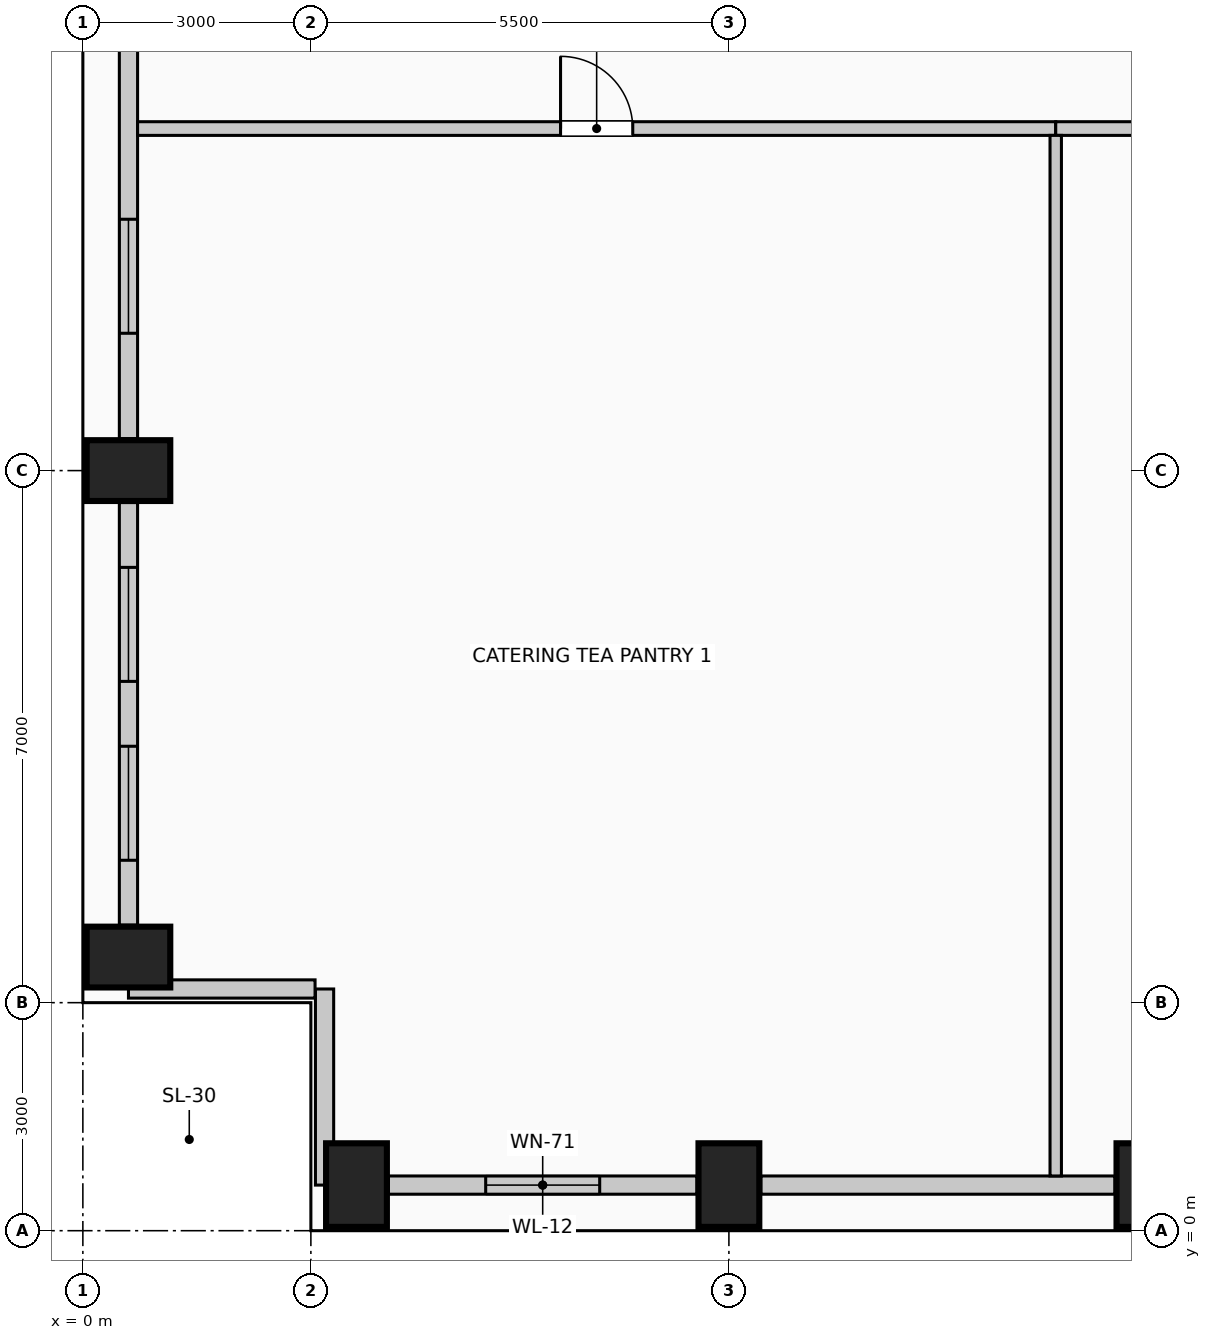
"""IFC4 building model, lengths in metres.
Left out: names, types, materials, properties, quantities, classifications, styles, units other than length and angle.
Written with IfcOpenShell. Run it as: python <this file> out.ifc"""

import sys

from ifc_helpers import new_model, si_unit, direction, frame, frame_2d, origin, origin_2d, place, context, subcontext, project, spatial, rectangle, extrude, element, fill, save


model = new_model("IFC4")
c1 = context("Model", 3, precision=1e-05, world=origin(), true_north=direction((0.0, 1.0)))
c2 = subcontext(c1, "Body", "Model", "MODEL_VIEW")
j1 = project(units=[si_unit("LENGTHUNIT", "METRE"), si_unit("PLANEANGLEUNIT", "RADIAN")], contexts=[c1])
p1 = place(None, origin())
s1 = spatial("IfcSite", under=j1, at=p1, CompositionType="ELEMENT")
p2 = place(p1, origin())
s2 = spatial("IfcBuilding", under=s1, at=p2, CompositionType="ELEMENT")
p3 = place(p2, frame((0.0, 0.0, 218.6)))
s3 = spatial("IfcBuildingStorey", under=s2, at=p3, CompositionType="ELEMENT", Elevation=218.6)
for number, where, z_axis, x_axis in (
    (1, (3.6, 0.6, 0.0), (0.0, 0.0, 1.0), (1.0, 0.0, 0.0)),
    (2, (8.5, 0.6, 0.0), (0.0, 0.0, 1.0), (1.0, 0.0, 0.0)),
    (3, (14.0, 0.6, 0.0), (0.0, 0.0, 1.0), (1.0, 0.0, 0.0)),
    (4, (0.6, 3.6, 0.0), (0.0, 0.0, 1.0), (0.0, 1.0, 0.0)),
    (5, (0.6, 10.0, 0.0), (0.0, 0.0, 1.0), (0.0, 1.0, 0.0)),
):
    element("IfcColumn", number, at=place(p3, frame(where, z_axis=z_axis, x_axis=x_axis)), inside=s3, PredefinedType="COLUMN", context=c2, shape_type="SweptSolid", body=[
        extrude(rectangle(XDim=0.8, YDim=1.1, at=origin_2d()), origin(), (0.0, 0.0, 1.0), 4.0),
    ])
p4 = place(p3, frame((8.08, 0.6, 0.0), z_axis=(0.0, 0.0, 1.0), x_axis=(-1.0, 0.0, 0.0)))
e6 = element("IfcWall", 6, at=p4, inside=s3, PredefinedType="SOLIDWALL", context=c2, shape_type="SweptSolid", body=[
    extrude(rectangle(XDim=4.06, YDim=0.24, at=frame_2d((2.03, 0.0))), origin(), (0.0, 0.0, 1.0), 3.0),
])
p5 = place(p4, frame((1.28, 0.0, 0.42)))
e7 = element("IfcOpeningElement", 7, at=p5, cuts=e6, PredefinedType="OPENING", context=c2, shape_type="SweptSolid", body=[
    extrude(rectangle(XDim=1.5, YDim=2.2, at=frame_2d((0.75, 1.1))), frame((0.0, 0.13, 0.0), z_axis=(0.0, -1.0, 0.0), x_axis=(1.0, 0.0, 0.0)), (0.0, 0.0, 1.0), 0.26),
])
p6 = place(p3, frame((13.58, 0.6, 0.0), z_axis=(0.0, 0.0, 1.0), x_axis=(-1.0, 0.0, 0.0)))
e8 = element("IfcWall", 8, at=p6, inside=s3, PredefinedType="SOLIDWALL", context=c2, shape_type="SweptSolid", body=[
    extrude(rectangle(XDim=4.66, YDim=0.24, at=frame_2d((2.33, 0.0))), origin(), (0.0, 0.0, 1.0), 3.0),
])
p7 = place(p3, frame((0.6, 4.02, 0.0), z_axis=(0.0, 0.0, 1.0), x_axis=(0.0, 1.0, 0.0)))
e9 = element("IfcWall", 9, at=p7, inside=s3, PredefinedType="SOLIDWALL", context=c2, shape_type="SweptSolid", body=[
    extrude(rectangle(XDim=5.56, YDim=0.24, at=frame_2d((2.78, 0.0))), origin(), (0.0, 0.0, 1.0), 3.0),
])
p8 = place(p7, frame((0.853, 0.0, 0.42)))
e10 = element("IfcOpeningElement", 10, at=p8, cuts=e9, PredefinedType="OPENING", context=c2, shape_type="SweptSolid", body=[
    extrude(rectangle(XDim=1.5, YDim=2.2, at=frame_2d((0.75, 1.1))), frame((0.0, 0.13, 0.0), z_axis=(0.0, -1.0, 0.0), x_axis=(1.0, 0.0, 0.0)), (0.0, 0.0, 1.0), 0.26),
])
p9 = place(p7, frame((3.207, 0.0, 0.42)))
e11 = element("IfcOpeningElement", 11, at=p9, cuts=e9, PredefinedType="OPENING", context=c2, shape_type="SweptSolid", body=[
    extrude(rectangle(XDim=1.5, YDim=2.2, at=frame_2d((0.75, 1.1))), frame((0.0, 0.13, 0.0), z_axis=(0.0, -1.0, 0.0), x_axis=(1.0, 0.0, 0.0)), (0.0, 0.0, 1.0), 0.26),
])
p10 = place(p3, frame((0.6, 10.42, 0.0), z_axis=(0.0, 0.0, 1.0), x_axis=(0.0, 1.0, 0.0)))
e12 = element("IfcWall", 12, at=p10, inside=s3, PredefinedType="SOLIDWALL", context=c2, shape_type="SweptSolid", body=[
    extrude(rectangle(XDim=7.16, YDim=0.24, at=frame_2d((3.58, 0.0))), origin(), (0.0, 0.0, 1.0), 3.0),
])
p11 = place(p10, frame((1.387, 0.0, 0.42)))
e13 = element("IfcOpeningElement", 13, at=p11, cuts=e12, PredefinedType="OPENING", context=c2, shape_type="SweptSolid", body=[
    extrude(rectangle(XDim=1.5, YDim=2.2, at=frame_2d((0.75, 1.1))), frame((0.0, 0.13, 0.0), z_axis=(0.0, -1.0, 0.0), x_axis=(1.0, 0.0, 0.0)), (0.0, 0.0, 1.0), 0.26),
])
p12 = place(p3, frame((3.18, 0.6, 0.0), z_axis=(0.0, 0.0, 1.0), x_axis=(0.0, 1.0, 0.0)))
e14 = element("IfcWall", 14, at=p12, inside=s3, PredefinedType="SOLIDWALL", context=c2, shape_type="SweptSolid", body=[
    extrude(rectangle(XDim=2.58, YDim=0.24, at=frame_2d((1.29, 0.0))), origin(), (0.0, 0.0, 1.0), 3.75),
])
p13 = place(p3, frame((3.055, 3.18, 0.0), z_axis=(0.0, 0.0, 1.0), x_axis=(-1.0, 0.0, 0.0)))
e15 = element("IfcWall", 15, at=p13, inside=s3, PredefinedType="SOLIDWALL", context=c2, shape_type="SweptSolid", body=[
    extrude(rectangle(XDim=2.455, YDim=0.24, at=frame_2d((1.228, 0.0))), origin(), (0.0, 0.0, 1.0), 3.75),
])
p14 = place(p3, frame((0.72, 14.5, 0.0), z_axis=(0.0, 0.0, 1.0), x_axis=(1.0, 0.0, 0.0)))
e16 = element("IfcWall", 16, at=p14, inside=s3, PredefinedType="PARTITIONING", context=c2, shape_type="SweptSolid", body=[
    extrude(rectangle(XDim=12.08, YDim=0.18, at=frame_2d((6.04, 0.0))), origin(), (0.0, 0.0, 1.0), 3.75),
])
p15 = place(p14, frame((5.565, 0.0, 0.0)))
e17 = element("IfcOpeningElement", 17, at=p15, cuts=e16, PredefinedType="OPENING", context=c2, shape_type="SweptSolid", body=[
    extrude(rectangle(XDim=0.95, YDim=2.15, at=frame_2d((0.475, 1.075))), frame((0.0, 0.1, 0.0), z_axis=(0.0, -1.0, 0.0), x_axis=(1.0, 0.0, 0.0)), (0.0, 0.0, 1.0), 0.2),
])
p16 = place(p3, frame((12.8, 14.5, 0.0), z_axis=(0.0, 0.0, 1.0), x_axis=(1.0, 0.0, 0.0)))
e18 = element("IfcWall", 18, at=p16, inside=s3, PredefinedType="PARTITIONING", context=c2, shape_type="SweptSolid", body=[
    extrude(rectangle(XDim=10.3, YDim=0.18, at=frame_2d((5.15, 0.0))), origin(), (0.0, 0.0, 1.0), 3.75),
])
p17 = place(p16, frame((4.625, 0.0, 0.0)))
e19 = element("IfcOpeningElement", 19, at=p17, cuts=e18, PredefinedType="OPENING", context=c2, shape_type="SweptSolid", body=[
    extrude(rectangle(XDim=1.05, YDim=2.15, at=frame_2d((0.525, 1.075))), frame((0.0, 0.1, 0.0), z_axis=(0.0, -1.0, 0.0), x_axis=(1.0, 0.0, 0.0)), (0.0, 0.0, 1.0), 0.2),
])
p18 = place(p3, frame((12.8, 0.72, 0.0), z_axis=(0.0, 0.0, 1.0), x_axis=(0.0, 1.0, 0.0)))
e20 = element("IfcWall", 20, at=p18, inside=s3, PredefinedType="PARTITIONING", context=c2, shape_type="SweptSolid", body=[
    extrude(rectangle(XDim=13.69, YDim=0.15, at=frame_2d((6.845, 0.0))), origin(), (0.0, 0.0, 1.0), 3.75),
])
p19 = place(p5, origin())
e21 = element("IfcWindow", 21, at=p19, inside=s3, PartitioningType="SINGLE_PANEL", PredefinedType="WINDOW", context=c2, shape_type="SweptSolid", body=[
    extrude(rectangle(XDim=1.5, YDim=2.2, at=frame_2d((0.75, 1.1))), frame((0.0, 0.03, 0.0), z_axis=(0.0, -1.0, 0.0), x_axis=(1.0, 0.0, 0.0)), (0.0, 0.0, 1.0), 0.06),
])
fill(e7, e21)
p20 = place(p8, origin())
e22 = element("IfcWindow", 22, at=p20, inside=s3, PartitioningType="SINGLE_PANEL", PredefinedType="WINDOW", context=c2, shape_type="SweptSolid", body=[
    extrude(rectangle(XDim=1.5, YDim=2.2, at=frame_2d((0.75, 1.1))), frame((0.0, 0.03, 0.0), z_axis=(0.0, -1.0, 0.0), x_axis=(1.0, 0.0, 0.0)), (0.0, 0.0, 1.0), 0.06),
])
fill(e10, e22)
p21 = place(p9, origin())
e23 = element("IfcWindow", 23, at=p21, inside=s3, PartitioningType="SINGLE_PANEL", PredefinedType="WINDOW", context=c2, shape_type="SweptSolid", body=[
    extrude(rectangle(XDim=1.5, YDim=2.2, at=frame_2d((0.75, 1.1))), frame((0.0, 0.03, 0.0), z_axis=(0.0, -1.0, 0.0), x_axis=(1.0, 0.0, 0.0)), (0.0, 0.0, 1.0), 0.06),
])
fill(e11, e23)
p22 = place(p11, origin())
e24 = element("IfcWindow", 24, at=p22, inside=s3, PartitioningType="SINGLE_PANEL", PredefinedType="WINDOW", context=c2, shape_type="SweptSolid", body=[
    extrude(rectangle(XDim=1.5, YDim=2.2, at=frame_2d((0.75, 1.1))), frame((0.0, 0.03, 0.0), z_axis=(0.0, -1.0, 0.0), x_axis=(1.0, 0.0, 0.0)), (0.0, 0.0, 1.0), 0.06),
])
fill(e13, e24)
p23 = place(p15, origin())
e25 = element("IfcDoor", 25, at=p23, inside=s3, OperationType="SINGLE_SWING_LEFT", PredefinedType="DOOR", context=c2, shape_type="SweptSolid", body=[
    extrude(rectangle(XDim=0.95, YDim=2.15, at=frame_2d((0.475, 1.075))), frame((0.0, 0.025, 0.0), z_axis=(0.0, -1.0, 0.0), x_axis=(1.0, 0.0, 0.0)), (0.0, 0.0, 1.0), 0.05),
])
fill(e17, e25)
save(model, sys.argv[1])
